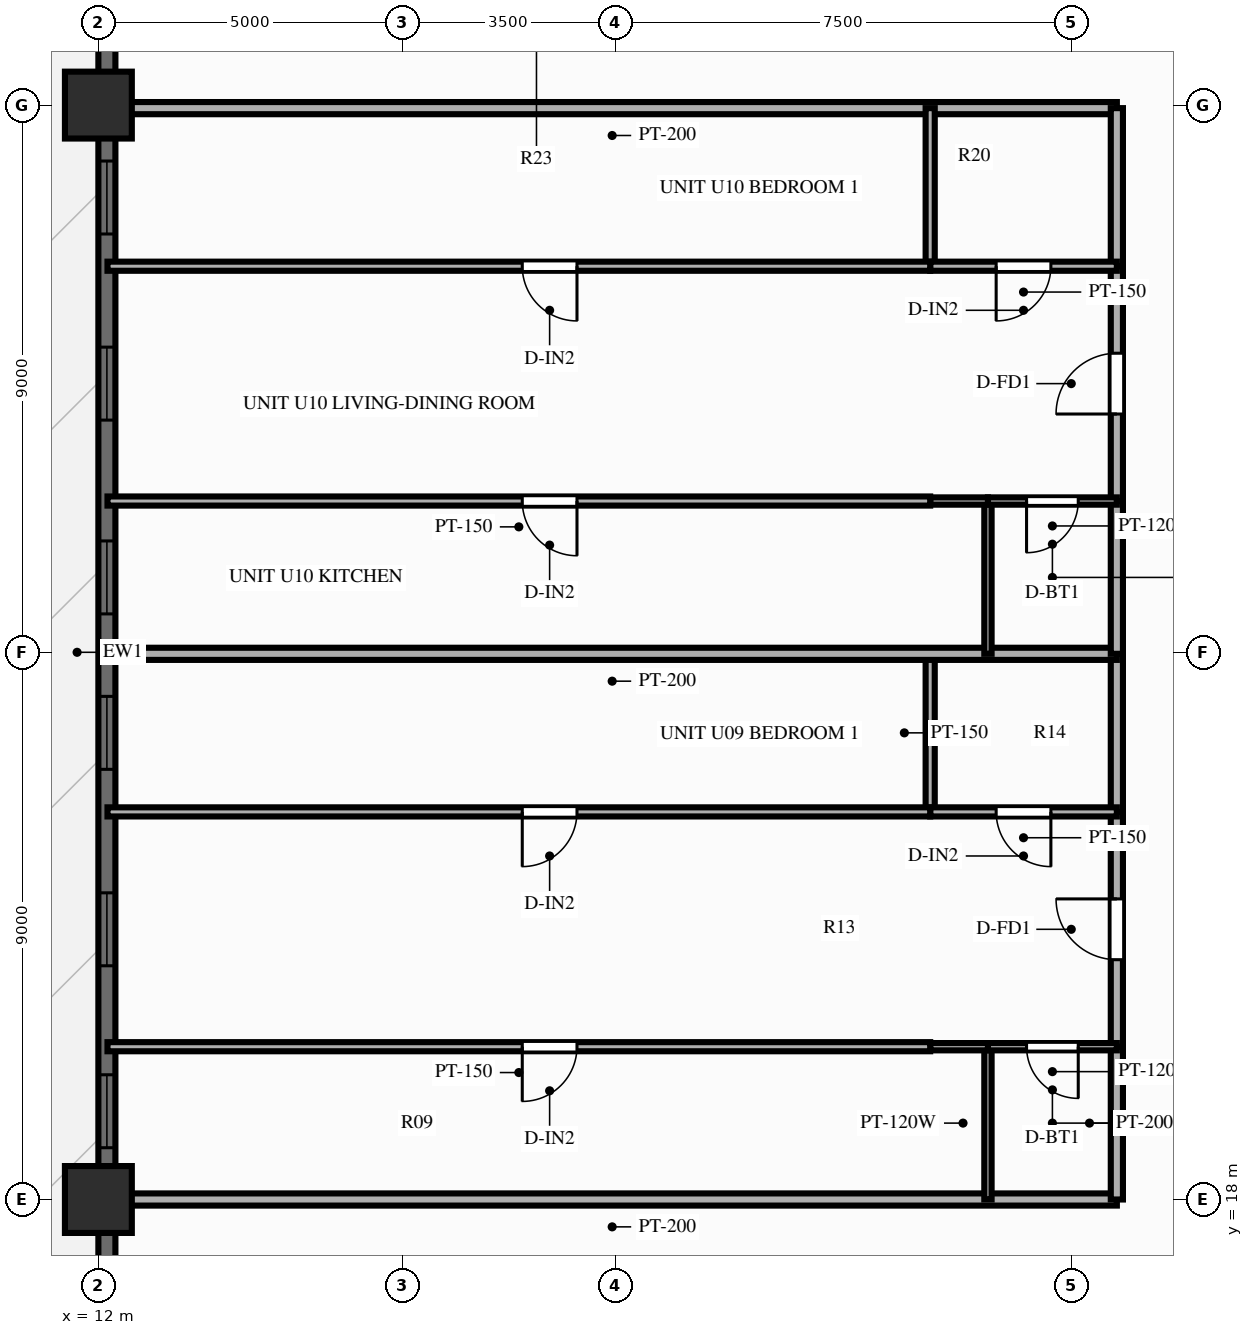
"""IFC4 building model, lengths in metres.
Left out: names, types, materials, properties, quantities, classifications, styles, units other than length and angle.
Written with IfcOpenShell. Run it as: python <this file> out.ifc"""

import sys

from ifc_helpers import new_model, si_unit, direction, frame, frame_2d, origin, origin_2d, place, context, subcontext, project, spatial, rectangle, extrude, source, transform, mapped, element, fill, save


model = new_model("IFC4")
c1 = context("Model", 3, precision=1e-05, world=origin(), true_north=direction((0.0, 1.0)))
c2 = subcontext(c1, "Body", "Model", "MODEL_VIEW")
j1 = project(units=[si_unit("LENGTHUNIT", "METRE"), si_unit("PLANEANGLEUNIT", "RADIAN")], contexts=[c1])
p1 = place(None, origin())
s1 = spatial("IfcSite", under=j1, at=p1, CompositionType="ELEMENT")
p2 = place(p1, origin())
s2 = spatial("IfcBuilding", under=s1, at=p2, CompositionType="ELEMENT")
p3 = place(p2, frame((0.0, 0.0, 43.4)))
s3 = spatial("IfcBuildingStorey", under=s2, at=p3, CompositionType="ELEMENT", Elevation=43.4)
m1 = source(origin(), c2, "Body", "SweptSolid", [
    extrude(rectangle(XDim=1.1, YDim=1.1, at=origin_2d()), origin(), (0.0, 0.0, 1.0), 3.0),
])
for number, where, z_axis, x_axis in (
    (1, (12.0, 36.0, 0.0), (0.0, 0.0, 1.0), (1.0, 0.0, 0.0)),
    (2, (12.0, 18.0, 0.0), (0.0, 0.0, 1.0), (1.0, 0.0, 0.0)),
):
    element("IfcColumn", number, at=place(p3, frame(where, z_axis=z_axis, x_axis=x_axis)), inside=s3, PredefinedType="COLUMN", context=c2, shape_type="MappedRepresentation", body=[
        mapped(m1, transform((0.0, 0.0, 0.0), scale=1.0)),
    ])
p4 = place(p3, frame((12.14, 6.5, 0.0), z_axis=(0.0, 0.0, 1.0), x_axis=(0.0, 1.0, 0.0)))
e3 = element("IfcWall", 3, at=p4, inside=s3, PredefinedType="SOLIDWALL", context=c2, shape_type="SweptSolid", body=[
    extrude(rectangle(XDim=41.0, YDim=0.28, at=frame_2d((20.5, 0.0))), origin(), (0.0, 0.0, 1.0), 2.28),
])
p5 = place(p4, frame((5.15, 0.0, 0.25)))
e4 = element("IfcOpeningElement", 4, at=p5, cuts=e3, PredefinedType="OPENING", context=c2, shape_type="SweptSolid", body=[
    extrude(rectangle(XDim=1.2, YDim=1.5, at=frame_2d((0.6, 0.75))), frame((0.0, 0.152, 0.0), z_axis=(0.0, -1.0, 0.0), x_axis=(1.0, 0.0, 0.0)), (0.0, 0.0, 1.0), 0.304),
])
p6 = place(p4, frame((12.352, 0.0, 0.25)))
e5 = element("IfcOpeningElement", 5, at=p6, cuts=e3, PredefinedType="OPENING", context=c2, shape_type="SweptSolid", body=[
    extrude(rectangle(XDim=1.2, YDim=1.5, at=frame_2d((0.6, 0.75))), frame((0.0, 0.152, 0.0), z_axis=(0.0, -1.0, 0.0), x_axis=(1.0, 0.0, 0.0)), (0.0, 0.0, 1.0), 0.304),
])
p7 = place(p4, frame((15.344, 0.0, 0.25)))
e6 = element("IfcOpeningElement", 6, at=p7, cuts=e3, PredefinedType="OPENING", context=c2, shape_type="SweptSolid", body=[
    extrude(rectangle(XDim=1.2, YDim=1.5, at=frame_2d((0.6, 0.75))), frame((0.0, 0.152, 0.0), z_axis=(0.0, -1.0, 0.0), x_axis=(1.0, 0.0, 0.0)), (0.0, 0.0, 1.0), 0.304),
])
p8 = place(p4, frame((18.575, 0.0, 0.25)))
e7 = element("IfcOpeningElement", 7, at=p8, cuts=e3, PredefinedType="OPENING", context=c2, shape_type="SweptSolid", body=[
    extrude(rectangle(XDim=1.2, YDim=1.5, at=frame_2d((0.6, 0.75))), frame((0.0, 0.152, 0.0), z_axis=(0.0, -1.0, 0.0), x_axis=(1.0, 0.0, 0.0)), (0.0, 0.0, 1.0), 0.304),
])
p9 = place(p4, frame((21.132, 0.0, 0.25)))
e8 = element("IfcOpeningElement", 8, at=p9, cuts=e3, PredefinedType="OPENING", context=c2, shape_type="SweptSolid", body=[
    extrude(rectangle(XDim=1.2, YDim=1.5, at=frame_2d((0.6, 0.75))), frame((0.0, 0.152, 0.0), z_axis=(0.0, -1.0, 0.0), x_axis=(1.0, 0.0, 0.0)), (0.0, 0.0, 1.0), 0.304),
])
p10 = place(p4, frame((24.319, 0.0, 0.25)))
e9 = element("IfcOpeningElement", 9, at=p10, cuts=e3, PredefinedType="OPENING", context=c2, shape_type="SweptSolid", body=[
    extrude(rectangle(XDim=1.2, YDim=1.5, at=frame_2d((0.6, 0.75))), frame((0.0, 0.152, 0.0), z_axis=(0.0, -1.0, 0.0), x_axis=(1.0, 0.0, 0.0)), (0.0, 0.0, 1.0), 0.304),
])
p11 = place(p4, frame((27.38, 0.0, 0.25)))
e10 = element("IfcOpeningElement", 10, at=p11, cuts=e3, PredefinedType="OPENING", context=c2, shape_type="SweptSolid", body=[
    extrude(rectangle(XDim=1.2, YDim=1.5, at=frame_2d((0.6, 0.75))), frame((0.0, 0.152, 0.0), z_axis=(0.0, -1.0, 0.0), x_axis=(1.0, 0.0, 0.0)), (0.0, 0.0, 1.0), 0.304),
])
p12 = place(p4, frame((34.45, 0.0, 0.0)))
e11 = element("IfcOpeningElement", 11, at=p12, cuts=e3, PredefinedType="OPENING", context=c2, shape_type="SweptSolid", body=[
    extrude(rectangle(XDim=1.6, YDim=2.15, at=frame_2d((0.8, 1.075))), frame((0.0, 0.152, 0.0), z_axis=(0.0, -1.0, 0.0), x_axis=(1.0, 0.0, 0.0)), (0.0, 0.0, 1.0), 0.304),
])
for number, where, z_axis, x_axis in (
    (12, (28.75, 18.0, 0.0), (0.0, 0.0, 1.0), (-1.0, 0.0, 0.0)),
    (13, (28.75, 35.95, 0.0), (0.0, 0.0, 1.0), (-1.0, 0.0, 0.0)),
):
    element("IfcWall", number, at=place(p3, frame(where, z_axis=z_axis, x_axis=x_axis)), inside=s3, PredefinedType="PARTITIONING", context=c2, shape_type="SweptSolid", body=[
        extrude(rectangle(XDim=16.6, YDim=0.2, at=frame_2d((8.3, 0.0))), origin(), (0.0, 0.0, 1.0), 2.24),
    ])
p13 = place(p3, frame((28.75, 18.0, 0.0), z_axis=(0.0, 0.0, 1.0), x_axis=(0.0, 1.0, 0.0)))
e14 = element("IfcWall", 14, at=p13, inside=s3, PredefinedType="PARTITIONING", context=c2, shape_type="SweptSolid", body=[
    extrude(rectangle(XDim=2.513, YDim=0.2, at=frame_2d((1.256, 0.0))), origin(), (0.0, 0.0, 1.0), 2.79),
])
p14 = place(p3, frame((28.75, 20.513, 0.0), z_axis=(0.0, 0.0, 1.0), x_axis=(0.0, 1.0, 0.0)))
e15 = element("IfcWall", 15, at=p14, inside=s3, PredefinedType="PARTITIONING", context=c2, shape_type="SweptSolid", body=[
    extrude(rectangle(XDim=3.862, YDim=0.2, at=frame_2d((1.931, 0.0))), origin(), (0.0, 0.0, 1.0), 2.79),
])
p15 = place(p14, frame((1.431, 0.0, 0.0)))
e16 = element("IfcOpeningElement", 16, at=p15, cuts=e15, PredefinedType="OPENING", context=c2, shape_type="SweptSolid", body=[
    extrude(rectangle(XDim=1.0, YDim=2.15, at=frame_2d((0.5, 1.075))), frame((0.0, 0.112, 0.0), z_axis=(0.0, -1.0, 0.0), x_axis=(1.0, 0.0, 0.0)), (0.0, 0.0, 1.0), 0.224),
])
p16 = place(p3, frame((28.75, 24.375, 0.0), z_axis=(0.0, 0.0, 1.0), x_axis=(0.0, 1.0, 0.0)))
e17 = element("IfcWall", 17, at=p16, inside=s3, PredefinedType="PARTITIONING", context=c2, shape_type="SweptSolid", body=[
    extrude(rectangle(XDim=2.6, YDim=0.2, at=frame_2d((1.3, 0.0))), origin(), (0.0, 0.0, 1.0), 2.79),
])
p17 = place(p3, frame((26.63, 18.0, 0.0), z_axis=(0.0, 0.0, 1.0), x_axis=(0.0, 1.0, 0.0)))
e18 = element("IfcWall", 18, at=p17, inside=s3, PredefinedType="PARTITIONING", context=c2, shape_type="SweptSolid", body=[
    extrude(rectangle(XDim=2.513, YDim=0.12, at=frame_2d((1.256, 0.0))), origin(), (0.0, 0.0, 1.0), 2.79),
])
p18 = place(p3, frame((25.68, 24.375, 0.0), z_axis=(0.0, 0.0, 1.0), x_axis=(0.0, 1.0, 0.0)))
e19 = element("IfcWall", 19, at=p18, inside=s3, PredefinedType="PARTITIONING", context=c2, shape_type="SweptSolid", body=[
    extrude(rectangle(XDim=2.6, YDim=0.15, at=frame_2d((1.3, 0.0))), origin(), (0.0, 0.0, 1.0), 2.79),
])
p19 = place(p3, frame((28.75, 20.513, 0.0), z_axis=(0.0, 0.0, 1.0), x_axis=(-1.0, 0.0, 0.0)))
e20 = element("IfcWall", 20, at=p19, inside=s3, PredefinedType="PARTITIONING", context=c2, shape_type="SweptSolid", body=[
    extrude(rectangle(XDim=2.12, YDim=0.12, at=frame_2d((1.06, 0.0))), origin(), (0.0, 0.0, 1.0), 2.79),
])
p20 = place(p19, frame((0.635, 0.0, 0.0)))
e21 = element("IfcOpeningElement", 21, at=p20, cuts=e20, PredefinedType="OPENING", context=c2, shape_type="SweptSolid", body=[
    extrude(rectangle(XDim=0.85, YDim=2.05, at=frame_2d((0.425, 1.025))), frame((0.0, 0.072, 0.0), z_axis=(0.0, -1.0, 0.0), x_axis=(1.0, 0.0, 0.0)), (0.0, 0.0, 1.0), 0.144),
])
p21 = place(p3, frame((26.63, 20.513, 0.0), z_axis=(0.0, 0.0, 1.0), x_axis=(-1.0, 0.0, 0.0)))
e22 = element("IfcWall", 22, at=p21, inside=s3, PredefinedType="PARTITIONING", context=c2, shape_type="SweptSolid", body=[
    extrude(rectangle(XDim=0.95, YDim=0.12, at=frame_2d((0.475, 0.0))), origin(), (0.0, 0.0, 1.0), 2.79),
])
p22 = place(p3, frame((25.68, 20.513, 0.0), z_axis=(0.0, 0.0, 1.0), x_axis=(-1.0, 0.0, 0.0)))
e23 = element("IfcWall", 23, at=p22, inside=s3, PredefinedType="PARTITIONING", context=c2, shape_type="SweptSolid", body=[
    extrude(rectangle(XDim=13.53, YDim=0.15, at=frame_2d((6.765, 0.0))), origin(), (0.0, 0.0, 1.0), 2.79),
])
p23 = place(p22, frame((5.809, 0.0, 0.0)))
e24 = element("IfcOpeningElement", 24, at=p23, cuts=e23, PredefinedType="OPENING", context=c2, shape_type="SweptSolid", body=[
    extrude(rectangle(XDim=0.9, YDim=2.1, at=frame_2d((0.45, 1.05))), frame((0.0, 0.087, 0.0), z_axis=(0.0, -1.0, 0.0), x_axis=(1.0, 0.0, 0.0)), (0.0, 0.0, 1.0), 0.174),
])
p24 = place(p3, frame((28.75, 24.375, 0.0), z_axis=(0.0, 0.0, 1.0), x_axis=(-1.0, 0.0, 0.0)))
e25 = element("IfcWall", 25, at=p24, inside=s3, PredefinedType="PARTITIONING", context=c2, shape_type="SweptSolid", body=[
    extrude(rectangle(XDim=3.07, YDim=0.15, at=frame_2d((1.535, 0.0))), origin(), (0.0, 0.0, 1.0), 2.79),
])
p25 = place(p24, frame((1.085, 0.0, 0.0)))
e26 = element("IfcOpeningElement", 26, at=p25, cuts=e25, PredefinedType="OPENING", context=c2, shape_type="SweptSolid", body=[
    extrude(rectangle(XDim=0.9, YDim=2.1, at=frame_2d((0.45, 1.05))), frame((0.0, 0.087, 0.0), z_axis=(0.0, -1.0, 0.0), x_axis=(1.0, 0.0, 0.0)), (0.0, 0.0, 1.0), 0.174),
])
p26 = place(p3, frame((25.68, 24.375, 0.0), z_axis=(0.0, 0.0, 1.0), x_axis=(-1.0, 0.0, 0.0)))
e27 = element("IfcWall", 27, at=p26, inside=s3, PredefinedType="PARTITIONING", context=c2, shape_type="SweptSolid", body=[
    extrude(rectangle(XDim=13.53, YDim=0.15, at=frame_2d((6.765, 0.0))), origin(), (0.0, 0.0, 1.0), 2.79),
])
p27 = place(p26, frame((5.809, 0.0, 0.0)))
e28 = element("IfcOpeningElement", 28, at=p27, cuts=e27, PredefinedType="OPENING", context=c2, shape_type="SweptSolid", body=[
    extrude(rectangle(XDim=0.9, YDim=2.1, at=frame_2d((0.45, 1.05))), frame((0.0, 0.087, 0.0), z_axis=(0.0, -1.0, 0.0), x_axis=(1.0, 0.0, 0.0)), (0.0, 0.0, 1.0), 0.174),
])
p28 = place(p3, frame((28.75, 26.975, 0.0), z_axis=(0.0, 0.0, 1.0), x_axis=(-1.0, 0.0, 0.0)))
e29 = element("IfcWall", 29, at=p28, inside=s3, PredefinedType="PARTITIONING", context=c2, shape_type="SweptSolid", body=[
    extrude(rectangle(XDim=16.6, YDim=0.2, at=frame_2d((8.3, 0.0))), origin(), (0.0, 0.0, 1.0), 2.79),
])
p29 = place(p3, frame((28.75, 26.975, 0.0), z_axis=(0.0, 0.0, 1.0), x_axis=(0.0, 1.0, 0.0)))
e30 = element("IfcWall", 30, at=p29, inside=s3, PredefinedType="PARTITIONING", context=c2, shape_type="SweptSolid", body=[
    extrude(rectangle(XDim=2.513, YDim=0.2, at=frame_2d((1.256, 0.0))), origin(), (0.0, 0.0, 1.0), 2.79),
])
p30 = place(p3, frame((28.75, 29.488, 0.0), z_axis=(0.0, 0.0, 1.0), x_axis=(0.0, 1.0, 0.0)))
e31 = element("IfcWall", 31, at=p30, inside=s3, PredefinedType="PARTITIONING", context=c2, shape_type="SweptSolid", body=[
    extrude(rectangle(XDim=3.862, YDim=0.2, at=frame_2d((1.931, 0.0))), origin(), (0.0, 0.0, 1.0), 2.79),
])
p31 = place(p30, frame((1.431, 0.0, 0.0)))
e32 = element("IfcOpeningElement", 32, at=p31, cuts=e31, PredefinedType="OPENING", context=c2, shape_type="SweptSolid", body=[
    extrude(rectangle(XDim=1.0, YDim=2.15, at=frame_2d((0.5, 1.075))), frame((0.0, 0.112, 0.0), z_axis=(0.0, -1.0, 0.0), x_axis=(1.0, 0.0, 0.0)), (0.0, 0.0, 1.0), 0.224),
])
p32 = place(p3, frame((28.75, 33.35, 0.0), z_axis=(0.0, 0.0, 1.0), x_axis=(0.0, 1.0, 0.0)))
e33 = element("IfcWall", 33, at=p32, inside=s3, PredefinedType="PARTITIONING", context=c2, shape_type="SweptSolid", body=[
    extrude(rectangle(XDim=2.6, YDim=0.2, at=frame_2d((1.3, 0.0))), origin(), (0.0, 0.0, 1.0), 2.79),
])
p33 = place(p3, frame((26.63, 26.975, 0.0), z_axis=(0.0, 0.0, 1.0), x_axis=(0.0, 1.0, 0.0)))
e34 = element("IfcWall", 34, at=p33, inside=s3, PredefinedType="PARTITIONING", context=c2, shape_type="SweptSolid", body=[
    extrude(rectangle(XDim=2.513, YDim=0.12, at=frame_2d((1.256, 0.0))), origin(), (0.0, 0.0, 1.0), 2.79),
])
p34 = place(p3, frame((25.68, 33.35, 0.0), z_axis=(0.0, 0.0, 1.0), x_axis=(0.0, 1.0, 0.0)))
e35 = element("IfcWall", 35, at=p34, inside=s3, PredefinedType="PARTITIONING", context=c2, shape_type="SweptSolid", body=[
    extrude(rectangle(XDim=2.6, YDim=0.15, at=frame_2d((1.3, 0.0))), origin(), (0.0, 0.0, 1.0), 2.79),
])
p35 = place(p3, frame((28.75, 29.488, 0.0), z_axis=(0.0, 0.0, 1.0), x_axis=(-1.0, 0.0, 0.0)))
e36 = element("IfcWall", 36, at=p35, inside=s3, PredefinedType="PARTITIONING", context=c2, shape_type="SweptSolid", body=[
    extrude(rectangle(XDim=2.12, YDim=0.12, at=frame_2d((1.06, 0.0))), origin(), (0.0, 0.0, 1.0), 2.79),
])
p36 = place(p35, frame((0.635, 0.0, 0.0)))
e37 = element("IfcOpeningElement", 37, at=p36, cuts=e36, PredefinedType="OPENING", context=c2, shape_type="SweptSolid", body=[
    extrude(rectangle(XDim=0.85, YDim=2.05, at=frame_2d((0.425, 1.025))), frame((0.0, 0.072, 0.0), z_axis=(0.0, -1.0, 0.0), x_axis=(1.0, 0.0, 0.0)), (0.0, 0.0, 1.0), 0.144),
])
p37 = place(p3, frame((26.63, 29.488, 0.0), z_axis=(0.0, 0.0, 1.0), x_axis=(-1.0, 0.0, 0.0)))
e38 = element("IfcWall", 38, at=p37, inside=s3, PredefinedType="PARTITIONING", context=c2, shape_type="SweptSolid", body=[
    extrude(rectangle(XDim=0.95, YDim=0.12, at=frame_2d((0.475, 0.0))), origin(), (0.0, 0.0, 1.0), 2.79),
])
p38 = place(p3, frame((25.68, 29.488, 0.0), z_axis=(0.0, 0.0, 1.0), x_axis=(-1.0, 0.0, 0.0)))
e39 = element("IfcWall", 39, at=p38, inside=s3, PredefinedType="PARTITIONING", context=c2, shape_type="SweptSolid", body=[
    extrude(rectangle(XDim=13.53, YDim=0.15, at=frame_2d((6.765, 0.0))), origin(), (0.0, 0.0, 1.0), 2.79),
])
p39 = place(p38, frame((5.809, 0.0, 0.0)))
e40 = element("IfcOpeningElement", 40, at=p39, cuts=e39, PredefinedType="OPENING", context=c2, shape_type="SweptSolid", body=[
    extrude(rectangle(XDim=0.9, YDim=2.1, at=frame_2d((0.45, 1.05))), frame((0.0, 0.087, 0.0), z_axis=(0.0, -1.0, 0.0), x_axis=(1.0, 0.0, 0.0)), (0.0, 0.0, 1.0), 0.174),
])
p40 = place(p3, frame((28.75, 33.35, 0.0), z_axis=(0.0, 0.0, 1.0), x_axis=(-1.0, 0.0, 0.0)))
e41 = element("IfcWall", 41, at=p40, inside=s3, PredefinedType="PARTITIONING", context=c2, shape_type="SweptSolid", body=[
    extrude(rectangle(XDim=3.07, YDim=0.15, at=frame_2d((1.535, 0.0))), origin(), (0.0, 0.0, 1.0), 2.79),
])
p41 = place(p40, frame((1.085, 0.0, 0.0)))
e42 = element("IfcOpeningElement", 42, at=p41, cuts=e41, PredefinedType="OPENING", context=c2, shape_type="SweptSolid", body=[
    extrude(rectangle(XDim=0.9, YDim=2.1, at=frame_2d((0.45, 1.05))), frame((0.0, 0.087, 0.0), z_axis=(0.0, -1.0, 0.0), x_axis=(1.0, 0.0, 0.0)), (0.0, 0.0, 1.0), 0.174),
])
p42 = place(p3, frame((25.68, 33.35, 0.0), z_axis=(0.0, 0.0, 1.0), x_axis=(-1.0, 0.0, 0.0)))
e43 = element("IfcWall", 43, at=p42, inside=s3, PredefinedType="PARTITIONING", context=c2, shape_type="SweptSolid", body=[
    extrude(rectangle(XDim=13.53, YDim=0.15, at=frame_2d((6.765, 0.0))), origin(), (0.0, 0.0, 1.0), 2.79),
])
p43 = place(p42, frame((5.809, 0.0, 0.0)))
e44 = element("IfcOpeningElement", 44, at=p43, cuts=e43, PredefinedType="OPENING", context=c2, shape_type="SweptSolid", body=[
    extrude(rectangle(XDim=0.9, YDim=2.1, at=frame_2d((0.45, 1.05))), frame((0.0, 0.087, 0.0), z_axis=(0.0, -1.0, 0.0), x_axis=(1.0, 0.0, 0.0)), (0.0, 0.0, 1.0), 0.174),
])
m2 = source(origin(), c2, "Body", "SweptSolid", [
    extrude(rectangle(XDim=1.2, YDim=1.5, at=frame_2d((0.6, 0.75))), frame((0.0, 0.03, 0.0), z_axis=(0.0, -1.0, 0.0), x_axis=(1.0, 0.0, 0.0)), (0.0, 0.0, 1.0), 0.06),
])
p44 = place(p6, origin())
e45 = element("IfcWindow", 45, at=p44, inside=s3, PartitioningType="SINGLE_PANEL", PredefinedType="WINDOW", context=c2, shape_type="MappedRepresentation", body=[
    mapped(m2, transform((0.0, 0.0, 0.0), scale=1.0)),
])
fill(e5, e45)
p45 = place(p7, origin())
e46 = element("IfcWindow", 46, at=p45, inside=s3, PartitioningType="SINGLE_PANEL", PredefinedType="WINDOW", context=c2, shape_type="MappedRepresentation", body=[
    mapped(m2, transform((0.0, 0.0, 0.0), scale=1.0)),
])
fill(e6, e46)
p46 = place(p8, origin())
e47 = element("IfcWindow", 47, at=p46, inside=s3, PartitioningType="SINGLE_PANEL", PredefinedType="WINDOW", context=c2, shape_type="MappedRepresentation", body=[
    mapped(m2, transform((0.0, 0.0, 0.0), scale=1.0)),
])
fill(e7, e47)
p47 = place(p9, origin())
e48 = element("IfcWindow", 48, at=p47, inside=s3, PartitioningType="SINGLE_PANEL", PredefinedType="WINDOW", context=c2, shape_type="MappedRepresentation", body=[
    mapped(m2, transform((0.0, 0.0, 0.0), scale=1.0)),
])
fill(e8, e48)
p48 = place(p10, origin())
e49 = element("IfcWindow", 49, at=p48, inside=s3, PartitioningType="SINGLE_PANEL", PredefinedType="WINDOW", context=c2, shape_type="MappedRepresentation", body=[
    mapped(m2, transform((0.0, 0.0, 0.0), scale=1.0)),
])
fill(e9, e49)
p49 = place(p11, origin())
e50 = element("IfcWindow", 50, at=p49, inside=s3, PartitioningType="SINGLE_PANEL", PredefinedType="WINDOW", context=c2, shape_type="MappedRepresentation", body=[
    mapped(m2, transform((0.0, 0.0, 0.0), scale=1.0)),
])
fill(e10, e50)
m3 = source(origin(), c2, "Body", "SweptSolid", [
    extrude(rectangle(XDim=1.0, YDim=2.15, at=frame_2d((0.5, 1.075))), frame((0.0, 0.025, 0.0), z_axis=(0.0, -1.0, 0.0), x_axis=(1.0, 0.0, 0.0)), (0.0, 0.0, 1.0), 0.05),
])
p50 = place(p15, origin())
e51 = element("IfcDoor", 51, at=p50, inside=s3, OperationType="SINGLE_SWING_RIGHT", PredefinedType="DOOR", context=c2, shape_type="MappedRepresentation", body=[
    mapped(m3, transform((0.0, 0.0, 0.0), scale=1.0)),
])
fill(e16, e51)
m4 = source(origin(), c2, "Body", "SweptSolid", [
    extrude(rectangle(XDim=0.85, YDim=2.05, at=frame_2d((0.425, 1.025))), frame((0.0, 0.025, 0.0), z_axis=(0.0, -1.0, 0.0), x_axis=(1.0, 0.0, 0.0)), (0.0, 0.0, 1.0), 0.05),
])
p51 = place(p20, origin())
e52 = element("IfcDoor", 52, at=p51, inside=s3, OperationType="SINGLE_SWING_LEFT", PredefinedType="DOOR", context=c2, shape_type="MappedRepresentation", body=[
    mapped(m4, transform((0.0, 0.0, 0.0), scale=1.0)),
])
fill(e21, e52)
m5 = source(origin(), c2, "Body", "SweptSolid", [
    extrude(rectangle(XDim=0.9, YDim=2.1, at=frame_2d((0.45, 1.05))), frame((0.0, 0.025, 0.0), z_axis=(0.0, -1.0, 0.0), x_axis=(1.0, 0.0, 0.0)), (0.0, 0.0, 1.0), 0.05),
])
p52 = place(p23, origin())
e53 = element("IfcDoor", 53, at=p52, inside=s3, OperationType="SINGLE_SWING_RIGHT", PredefinedType="DOOR", context=c2, shape_type="MappedRepresentation", body=[
    mapped(m5, transform((0.0, 0.0, 0.0), scale=1.0)),
])
fill(e24, e53)
p53 = place(p25, origin())
e54 = element("IfcDoor", 54, at=p53, inside=s3, OperationType="SINGLE_SWING_LEFT", PredefinedType="DOOR", context=c2, shape_type="MappedRepresentation", body=[
    mapped(m5, transform((0.0, 0.0, 0.0), scale=1.0)),
])
fill(e26, e54)
p54 = place(p27, origin())
e55 = element("IfcDoor", 55, at=p54, inside=s3, OperationType="SINGLE_SWING_RIGHT", PredefinedType="DOOR", context=c2, shape_type="MappedRepresentation", body=[
    mapped(m5, transform((0.0, 0.0, 0.0), scale=1.0)),
])
fill(e28, e55)
p55 = place(p31, origin())
e56 = element("IfcDoor", 56, at=p55, inside=s3, OperationType="SINGLE_SWING_LEFT", PredefinedType="DOOR", context=c2, shape_type="MappedRepresentation", body=[
    mapped(m3, transform((0.0, 0.0, 0.0), scale=1.0)),
])
fill(e32, e56)
p56 = place(p36, origin())
e57 = element("IfcDoor", 57, at=p56, inside=s3, OperationType="SINGLE_SWING_RIGHT", PredefinedType="DOOR", context=c2, shape_type="MappedRepresentation", body=[
    mapped(m4, transform((0.0, 0.0, 0.0), scale=1.0)),
])
fill(e37, e57)
p57 = place(p39, origin())
e58 = element("IfcDoor", 58, at=p57, inside=s3, OperationType="SINGLE_SWING_LEFT", PredefinedType="DOOR", context=c2, shape_type="MappedRepresentation", body=[
    mapped(m5, transform((0.0, 0.0, 0.0), scale=1.0)),
])
fill(e40, e58)
p58 = place(p41, origin())
e59 = element("IfcDoor", 59, at=p58, inside=s3, OperationType="SINGLE_SWING_RIGHT", PredefinedType="DOOR", context=c2, shape_type="MappedRepresentation", body=[
    mapped(m5, transform((0.0, 0.0, 0.0), scale=1.0)),
])
fill(e42, e59)
p59 = place(p43, origin())
e60 = element("IfcDoor", 60, at=p59, inside=s3, OperationType="SINGLE_SWING_LEFT", PredefinedType="DOOR", context=c2, shape_type="MappedRepresentation", body=[
    mapped(m5, transform((0.0, 0.0, 0.0), scale=1.0)),
])
fill(e44, e60)
save(model, sys.argv[1])
